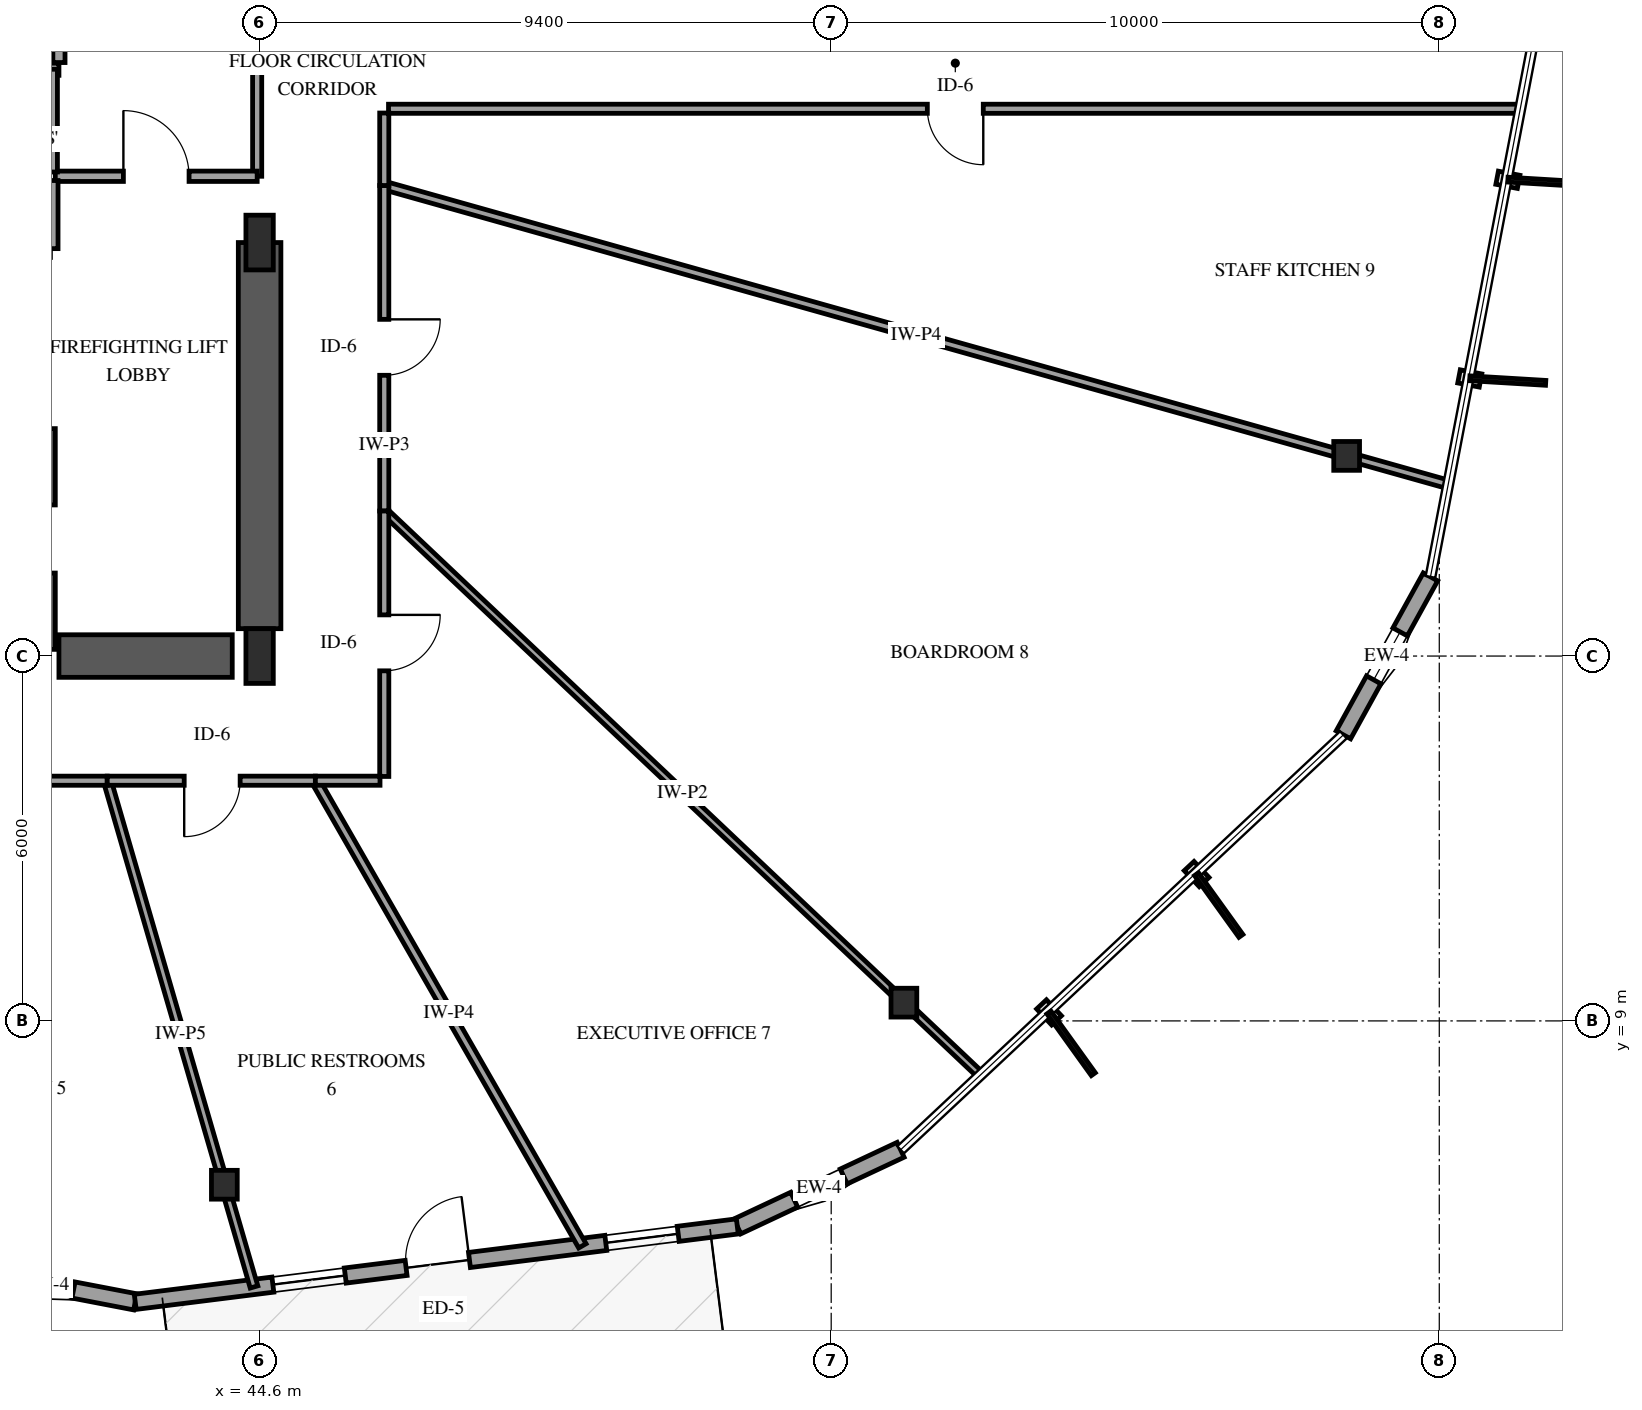
"""IFC4 building model, lengths in metres.
Left out: names, types, materials, properties, quantities, classifications, styles, units other than length and angle.
Written with IfcOpenShell. Run it as: python <this file> out.ifc"""

import sys

from ifc_helpers import new_model, si_unit, direction, frame, frame_2d, origin, origin_2d, place, context, subcontext, project, spatial, rectangle, i_section, extrude, element, fill, save


model = new_model("IFC4")
c1 = context("Model", 3, precision=1e-05, world=origin(), true_north=direction((0.0, 1.0)))
c2 = subcontext(c1, "Body", "Model", "MODEL_VIEW")
j1 = project(units=[si_unit("LENGTHUNIT", "METRE"), si_unit("PLANEANGLEUNIT", "RADIAN")], contexts=[c1])
p1 = place(None, origin())
s1 = spatial("IfcSite", under=j1, at=p1, CompositionType="ELEMENT")
p2 = place(p1, origin())
s2 = spatial("IfcBuilding", under=s1, at=p2, CompositionType="ELEMENT")
p3 = place(p2, frame((0.0, 0.0, 54.6)))
s3 = spatial("IfcBuildingStorey", under=s2, at=p3, CompositionType="ELEMENT", Elevation=54.6)
p4 = place(p3, frame((41.12, 15.11, 0.0), z_axis=(0.0, 0.0, 1.0), x_axis=(0.0, 1.0, 0.0)))
e1 = element("IfcWall", 1, at=p4, inside=s3, PredefinedType="SHEAR", context=c2, shape_type="SweptSolid", body=[
    extrude(rectangle(XDim=3.63, YDim=0.24, at=frame_2d((1.815, 0.0))), origin(), (0.0, 0.0, 1.0), 4.0),
])
p5 = place(p4, frame((1.255, 0.0, 0.0)))
e2 = element("IfcOpeningElement", 2, at=p5, cuts=e1, PredefinedType="OPENING", context=c2, shape_type="SweptSolid", body=[
    extrude(rectangle(XDim=1.12, YDim=2.15, at=frame_2d((0.56, 1.075))), frame((0.0, 0.13, 0.0), z_axis=(0.0, -1.0, 0.0), x_axis=(1.0, 0.0, 0.0)), (0.0, 0.0, 1.0), 0.26),
])
p6 = place(p3, frame((41.3, 15.0, 0.0), z_axis=(0.0, 0.0, 1.0), x_axis=(1.0, 0.0, 0.0)))
e3 = element("IfcWall", 3, at=p6, inside=s3, PredefinedType="SHEAR", context=c2, shape_type="SweptSolid", body=[
    extrude(rectangle(XDim=2.85, YDim=0.7, at=frame_2d((1.425, 0.0))), origin(), (0.0, 0.0, 1.0), 4.0),
])
p7 = place(p3, frame((44.6, 15.45, 0.0), z_axis=(0.0, 0.0, 1.0), x_axis=(0.0, 1.0, 0.0)))
e4 = element("IfcWall", 4, at=p7, inside=s3, PredefinedType="SHEAR", context=c2, shape_type="SweptSolid", body=[
    extrude(rectangle(XDim=6.35, YDim=0.7, at=frame_2d((3.175, 0.0))), origin(), (0.0, 0.0, 1.0), 4.0),
])
for number, where, z_axis, x_axis in (
    (5, (44.6, 15.0, 0.0), (0.0, 0.0, 1.0), (1.0, 0.0, 0.0)),
    (6, (44.6, 21.8, 0.0), (0.0, 0.0, 1.0), (1.0, 0.0, 0.0)),
):
    element("IfcColumn", number, at=place(p3, frame(where, z_axis=z_axis, x_axis=x_axis)), inside=s3, PredefinedType="PILASTER", context=c2, shape_type="SweptSolid", body=[
        extrude(rectangle(XDim=0.45, YDim=0.9, at=origin_2d()), origin(), (0.0, 0.0, 1.0), 4.0),
    ])
for number, where, z_axis, x_axis in (
    (7, (44.02, 6.306, 0.0), (0.0, 0.0, 1.0), (1.0, 0.0, 0.0)),
    (8, (55.196, 9.3, 0.0), (0.0, 0.0, 1.0), (1.0, 0.0, 0.0)),
    (9, (62.477, 18.292, 0.0), (0.0, 0.0, 1.0), (1.0, 0.0, 0.0)),
):
    element("IfcColumn", number, at=place(p3, frame(where, z_axis=z_axis, x_axis=x_axis)), inside=s3, PredefinedType="COLUMN", context=c2, shape_type="SweptSolid", body=[
        extrude(i_section(OverallWidth=0.424, OverallDepth=0.474, WebThickness=0.048, FlangeThickness=0.077, FilletRadius=0.038, at=origin_2d()), origin(), (0.0, 0.0, 1.0), 4.0),
    ])
p8 = place(p3, frame((39.641, 4.939, 0.0), z_axis=(0.0, 0.0, 1.0), x_axis=(0.982094979425, -0.188386441624, 0.0)))
e10 = element("IfcWall", 10, at=p8, inside=s3, PredefinedType="SOLIDWALL", context=c2, shape_type="SweptSolid", body=[
    extrude(rectangle(XDim=2.967, YDim=0.27, at=frame_2d((1.483, 0.0))), origin(), (0.0, 0.0, 1.0), 3.079),
])
p9 = place(p8, frame((1.033, 0.0, 0.75)))
e11 = element("IfcOpeningElement", 11, at=p9, cuts=e10, PredefinedType="OPENING", context=c2, shape_type="SweptSolid", body=[
    extrude(rectangle(XDim=0.9, YDim=1.5, at=frame_2d((0.45, 0.75))), frame((0.0, 0.145, 0.0), z_axis=(0.0, -1.0, 0.0), x_axis=(1.0, 0.0, 0.0)), (0.0, 0.0, 1.0), 0.29),
])
p10 = place(p3, frame((52.456, 5.62, 0.0), z_axis=(0.0, 0.0, 1.0), x_axis=(0.905276993573, 0.424821803711, 0.0)))
e12 = element("IfcWall", 12, at=p10, inside=s3, PredefinedType="SOLIDWALL", context=c2, shape_type="SweptSolid", body=[
    extrude(rectangle(XDim=2.967, YDim=0.27, at=frame_2d((1.483, 0.0))), origin(), (0.0, 0.0, 1.0), 3.079),
])
p11 = place(p10, frame((1.033, 0.0, 0.75)))
e13 = element("IfcOpeningElement", 13, at=p11, cuts=e12, PredefinedType="OPENING", context=c2, shape_type="SweptSolid", body=[
    extrude(rectangle(XDim=0.9, YDim=1.5, at=frame_2d((0.45, 0.75))), frame((0.0, 0.145, 0.0), z_axis=(0.0, -1.0, 0.0), x_axis=(1.0, 0.0, 0.0)), (0.0, 0.0, 1.0), 0.29),
])
p12 = place(p3, frame((42.554, 4.38, 0.0), z_axis=(0.0, 0.0, 1.0), x_axis=(0.992243587308, 0.124308742439, 0.0)))
e14 = element("IfcWall", 14, at=p12, inside=s3, PredefinedType="SOLIDWALL", context=c2, shape_type="SweptSolid", body=[
    extrude(rectangle(XDim=9.979, YDim=0.25, at=frame_2d((4.99, 0.0))), origin(), (0.0, 0.0, 1.0), 3.079),
])
p13 = place(p12, frame((4.49, 0.0, 0.0)))
e15 = element("IfcOpeningElement", 15, at=p13, cuts=e14, PredefinedType="OPENING", context=c2, shape_type="SweptSolid", body=[
    extrude(rectangle(XDim=1.05, YDim=2.15, at=frame_2d((0.525, 1.075))), frame((0.0, 0.135, 0.0), z_axis=(0.0, -1.0, 0.0), x_axis=(1.0, 0.0, 0.0)), (0.0, 0.0, 1.0), 0.27),
])
p14 = place(p12, frame((2.281, 0.0, 0.72)))
e16 = element("IfcOpeningElement", 16, at=p14, cuts=e14, PredefinedType="OPENING", context=c2, shape_type="SweptSolid", body=[
    extrude(rectangle(XDim=1.2, YDim=1.6, at=frame_2d((0.6, 0.8))), frame((0.0, 0.135, 0.0), z_axis=(0.0, -1.0, 0.0), x_axis=(1.0, 0.0, 0.0)), (0.0, 0.0, 1.0), 0.27),
])
p15 = place(p12, frame((7.799, 0.0, 0.72)))
e17 = element("IfcOpeningElement", 17, at=p15, cuts=e14, PredefinedType="OPENING", context=c2, shape_type="SweptSolid", body=[
    extrude(rectangle(XDim=1.2, YDim=1.6, at=frame_2d((0.6, 0.8))), frame((0.0, 0.135, 0.0), z_axis=(0.0, -1.0, 0.0), x_axis=(1.0, 0.0, 0.0)), (0.0, 0.0, 1.0), 0.27),
])
p16 = place(p3, frame((62.423, 13.704, 0.0), z_axis=(0.0, 0.0, 1.0), x_axis=(0.482670458227, 0.875802048841, 0.0)))
e18 = element("IfcWall", 18, at=p16, inside=s3, PredefinedType="SOLIDWALL", context=c2, shape_type="SweptSolid", body=[
    extrude(rectangle(XDim=2.967, YDim=0.27, at=frame_2d((1.483, 0.0))), origin(), (0.0, 0.0, 1.0), 3.079),
])
p17 = place(p16, frame((1.033, 0.0, 0.75)))
e19 = element("IfcOpeningElement", 19, at=p17, cuts=e18, PredefinedType="OPENING", context=c2, shape_type="SweptSolid", body=[
    extrude(rectangle(XDim=0.9, YDim=1.5, at=frame_2d((0.45, 0.75))), frame((0.0, 0.145, 0.0), z_axis=(0.0, -1.0, 0.0), x_axis=(1.0, 0.0, 0.0)), (0.0, 0.0, 1.0), 0.29),
])
p18 = place(p3, frame((39.3, 24.65, 0.0), z_axis=(0.0, 0.0, 1.0), x_axis=(1.0, 0.0, 0.0)))
e20 = element("IfcWall", 20, at=p18, inside=s3, PredefinedType="SOLIDWALL", context=c2, shape_type="SweptSolid", body=[
    extrude(rectangle(XDim=2.0, YDim=0.2, at=frame_2d((1.0, 0.0))), origin(), (0.0, 0.0, 1.0), 3.7),
])
p19 = place(p3, frame((41.3, 24.76, 0.0), z_axis=(0.0, 0.0, 1.0), x_axis=(0.0, 1.0, 0.0)))
e21 = element("IfcWall", 21, at=p19, inside=s3, PredefinedType="SOLIDWALL", context=c2, shape_type="SweptSolid", body=[
    extrude(rectangle(XDim=2.08, YDim=0.2, at=frame_2d((1.04, 0.0))), origin(), (0.0, 0.0, 1.0), 3.7),
])
p20 = place(p3, frame((65.332, 24.0, 0.0), z_axis=(0.0, 0.0, 1.0), x_axis=(-1.0, 0.0, 0.0)))
e22 = element("IfcWall", 22, at=p20, inside=s3, PredefinedType="PARTITIONING", context=c2, shape_type="SweptSolid", body=[
    extrude(rectangle(XDim=18.612, YDim=0.15, at=frame_2d((9.306, 0.0))), origin(), (0.0, 0.0, 1.0), 3.7),
])
p21 = place(p20, frame((8.831, 0.0, 0.0)))
e23 = element("IfcOpeningElement", 23, at=p21, cuts=e22, PredefinedType="OPENING", context=c2, shape_type="SweptSolid", body=[
    extrude(rectangle(XDim=0.92, YDim=2.12, at=frame_2d((0.46, 1.06))), frame((0.0, 0.085, 0.0), z_axis=(0.0, -1.0, 0.0), x_axis=(1.0, 0.0, 0.0)), (0.0, 0.0, 1.0), 0.17),
])
p22 = place(p3, frame((46.65, 22.738, 0.0), z_axis=(0.0, 0.0, 1.0), x_axis=(0.962723116404, -0.270488818886, 0.0)))
e24 = element("IfcWall", 24, at=p22, inside=s3, PredefinedType="PARTITIONING", context=c2, shape_type="SweptSolid", body=[
    extrude(rectangle(XDim=18.175, YDim=0.14, at=frame_2d((9.087, 0.0))), origin(), (0.0, 0.0, 1.0), 2.995),
])
p23 = place(p3, frame((46.65, 17.385, 0.0), z_axis=(0.0, 0.0, 1.0), x_axis=(0.726444008724, -0.687225655945, 0.0)))
e25 = element("IfcWall", 25, at=p23, inside=s3, PredefinedType="PARTITIONING", context=c2, shape_type="SweptSolid", body=[
    extrude(rectangle(XDim=13.496, YDim=0.12, at=frame_2d((6.748, 0.0))), origin(), (0.0, 0.0, 1.0), 2.995),
])
p24 = place(p3, frame((45.517, 12.95, 0.0), z_axis=(0.0, 0.0, 1.0), x_axis=(0.497852096221, -0.867261950214, 0.0)))
e26 = element("IfcWall", 26, at=p24, inside=s3, PredefinedType="PARTITIONING", context=c2, shape_type="SweptSolid", body=[
    extrude(rectangle(XDim=8.82, YDim=0.14, at=frame_2d((4.41, 0.0))), origin(), (0.0, 0.0, 1.0), 3.074),
])
p25 = place(p3, frame((42.094, 12.95, 0.0), z_axis=(0.0, 0.0, 1.0), x_axis=(0.278506003646, -0.960434488101, 0.0)))
e27 = element("IfcWall", 27, at=p25, inside=s3, PredefinedType="PARTITIONING", context=c2, shape_type="SweptSolid", body=[
    extrude(rectangle(XDim=8.668, YDim=0.13, at=frame_2d((4.334, 0.0))), origin(), (0.0, 0.0, 1.0), 2.995),
])
p26 = place(p3, frame((44.56, 29.8, 0.0), z_axis=(0.0, 0.0, 1.0), x_axis=(0.0, -1.0, 0.0)))
e28 = element("IfcWall", 28, at=p26, inside=s3, PredefinedType="PARTITIONING", context=c2, shape_type="SweptSolid", body=[
    extrude(rectangle(XDim=6.91, YDim=0.15, at=frame_2d((3.455, 0.0))), origin(), (0.0, 0.0, 1.0), 2.74),
])
p27 = place(p26, frame((2.915, 0.0, 0.0)))
e29 = element("IfcOpeningElement", 29, at=p27, cuts=e28, PredefinedType="OPENING", context=c2, shape_type="SweptSolid", body=[
    extrude(rectangle(XDim=1.08, YDim=2.15, at=frame_2d((0.54, 1.075))), frame((0.0, 0.085, 0.0), z_axis=(0.0, -1.0, 0.0), x_axis=(1.0, 0.0, 0.0)), (0.0, 0.0, 1.0), 0.17),
])
p28 = place(p3, frame((46.65, 22.738, 0.0), z_axis=(0.0, 0.0, 1.0), x_axis=(0.0, -1.0, 0.0)))
e30 = element("IfcWall", 30, at=p28, inside=s3, PredefinedType="PARTITIONING", context=c2, shape_type="SweptSolid", body=[
    extrude(rectangle(XDim=5.353, YDim=0.15, at=frame_2d((2.677, 0.0))), origin(), (0.0, 0.0, 1.0), 3.7),
])
p29 = place(p28, frame((2.201, 0.0, 0.0)))
e31 = element("IfcOpeningElement", 31, at=p29, cuts=e30, PredefinedType="OPENING", context=c2, shape_type="SweptSolid", body=[
    extrude(rectangle(XDim=0.92, YDim=2.12, at=frame_2d((0.46, 1.06))), frame((0.0, 0.085, 0.0), z_axis=(0.0, -1.0, 0.0), x_axis=(1.0, 0.0, 0.0)), (0.0, 0.0, 1.0), 0.17),
])
p30 = place(p3, frame((46.65, 17.385, 0.0), z_axis=(0.0, 0.0, 1.0), x_axis=(0.0, -1.0, 0.0)))
e32 = element("IfcWall", 32, at=p30, inside=s3, PredefinedType="PARTITIONING", context=c2, shape_type="SweptSolid", body=[
    extrude(rectangle(XDim=4.365, YDim=0.15, at=frame_2d((2.183, 0.0))), origin(), (0.0, 0.0, 1.0), 3.7),
])
p31 = place(p30, frame((1.708, 0.0, 0.0)))
e33 = element("IfcOpeningElement", 33, at=p31, cuts=e32, PredefinedType="OPENING", context=c2, shape_type="SweptSolid", body=[
    extrude(rectangle(XDim=0.92, YDim=2.12, at=frame_2d((0.46, 1.06))), frame((0.0, 0.085, 0.0), z_axis=(0.0, -1.0, 0.0), x_axis=(1.0, 0.0, 0.0)), (0.0, 0.0, 1.0), 0.17),
])
p32 = place(p3, frame((42.094, 12.95, 0.0), z_axis=(0.0, 0.0, 1.0), x_axis=(-1.0, 0.0, 0.0)))
e34 = element("IfcWall", 34, at=p32, inside=s3, PredefinedType="PARTITIONING", context=c2, shape_type="SweptSolid", body=[
    extrude(rectangle(XDim=4.313, YDim=0.15, at=frame_2d((2.156, 0.0))), origin(), (0.0, 0.0, 1.0), 3.7),
])
p33 = place(p32, frame((1.682, 0.0, 0.0)))
e35 = element("IfcOpeningElement", 35, at=p33, cuts=e34, PredefinedType="OPENING", context=c2, shape_type="SweptSolid", body=[
    extrude(rectangle(XDim=0.92, YDim=2.12, at=frame_2d((0.46, 1.06))), frame((0.0, 0.085, 0.0), z_axis=(0.0, -1.0, 0.0), x_axis=(1.0, 0.0, 0.0)), (0.0, 0.0, 1.0), 0.17),
])
p34 = place(p3, frame((45.517, 12.95, 0.0), z_axis=(0.0, 0.0, 1.0), x_axis=(-1.0, 0.0, 0.0)))
e36 = element("IfcWall", 36, at=p34, inside=s3, PredefinedType="PARTITIONING", context=c2, shape_type="SweptSolid", body=[
    extrude(rectangle(XDim=3.423, YDim=0.15, at=frame_2d((1.711, 0.0))), origin(), (0.0, 0.0, 1.0), 3.7),
])
p35 = place(p34, frame((1.237, 0.0, 0.0)))
e37 = element("IfcOpeningElement", 37, at=p35, cuts=e36, PredefinedType="OPENING", context=c2, shape_type="SweptSolid", body=[
    extrude(rectangle(XDim=0.92, YDim=2.12, at=frame_2d((0.46, 1.06))), frame((0.0, 0.085, 0.0), z_axis=(0.0, -1.0, 0.0), x_axis=(1.0, 0.0, 0.0)), (0.0, 0.0, 1.0), 0.17),
])
p36 = place(p3, frame((41.24, 22.89, 0.0), z_axis=(0.0, 0.0, 1.0), x_axis=(1.0, 0.0, 0.0)))
e38 = element("IfcWall", 38, at=p36, inside=s3, PredefinedType="PARTITIONING", context=c2, shape_type="SweptSolid", body=[
    extrude(rectangle(XDim=3.32, YDim=0.17, at=frame_2d((1.66, 0.0))), origin(), (0.0, 0.0, 1.0), 3.7),
])
p37 = place(p36, frame((1.12, 0.0, 0.0)))
e39 = element("IfcOpeningElement", 39, at=p37, cuts=e38, PredefinedType="OPENING", context=c2, shape_type="SweptSolid", body=[
    extrude(rectangle(XDim=1.08, YDim=2.15, at=frame_2d((0.54, 1.075))), frame((0.0, 0.095, 0.0), z_axis=(0.0, -1.0, 0.0), x_axis=(1.0, 0.0, 0.0)), (0.0, 0.0, 1.0), 0.19),
])
p38 = place(p3, frame((41.2, 22.96, 0.0), z_axis=(0.0, 0.0, 1.0), x_axis=(0.0, 1.0, 0.0)))
e40 = element("IfcWall", 40, at=p38, inside=s3, PredefinedType="PARTITIONING", context=c2, shape_type="SweptSolid", body=[
    extrude(rectangle(XDim=1.69, YDim=0.15, at=frame_2d((0.845, 0.0))), origin(), (0.0, 0.0, 1.0), 3.7),
])
p39 = place(p3, frame((46.65, 23.93, 0.0), z_axis=(0.0, 0.0, 1.0), x_axis=(0.0, -1.0, 0.0)))
e41 = element("IfcWall", 41, at=p39, inside=s3, PredefinedType="PARTITIONING", context=c2, shape_type="SweptSolid", body=[
    extrude(rectangle(XDim=1.192, YDim=0.15, at=frame_2d((0.596, 0.0))), origin(), (0.0, 0.0, 1.0), 3.7),
])
p40 = place(p3, frame((41.2, 21.7, 0.0), z_axis=(0.0, 0.0, 1.0), x_axis=(0.0, 1.0, 0.0)))
e42 = element("IfcWall", 42, at=p40, inside=s3, PredefinedType="PARTITIONING", context=c2, shape_type="SweptSolid", body=[
    extrude(rectangle(XDim=1.12, YDim=0.17, at=frame_2d((0.56, 0.0))), origin(), (0.0, 0.0, 1.0), 3.7),
])
p41 = place(p3, frame((46.58, 12.95, 0.0), z_axis=(0.0, 0.0, 1.0), x_axis=(-1.0, 0.0, 0.0)))
e43 = element("IfcWall", 43, at=p41, inside=s3, PredefinedType="PARTITIONING", context=c2, shape_type="SweptSolid", body=[
    extrude(rectangle(XDim=1.063, YDim=0.15, at=frame_2d((0.531, 0.0))), origin(), (0.0, 0.0, 1.0), 3.7),
])
p42 = place(p9, origin())
e44 = element("IfcWindow", 44, at=p42, inside=s3, PartitioningType="SINGLE_PANEL", PredefinedType="WINDOW", context=c2, shape_type="SweptSolid", body=[
    extrude(rectangle(XDim=0.9, YDim=1.5, at=frame_2d((0.45, 0.75))), frame((0.0, 0.03, 0.0), z_axis=(0.0, -1.0, 0.0), x_axis=(1.0, 0.0, 0.0)), (0.0, 0.0, 1.0), 0.06),
])
fill(e11, e44)
p43 = place(p11, origin())
e45 = element("IfcWindow", 45, at=p43, inside=s3, PartitioningType="SINGLE_PANEL", PredefinedType="WINDOW", context=c2, shape_type="SweptSolid", body=[
    extrude(rectangle(XDim=0.9, YDim=1.5, at=frame_2d((0.45, 0.75))), frame((0.0, 0.03, 0.0), z_axis=(0.0, -1.0, 0.0), x_axis=(1.0, 0.0, 0.0)), (0.0, 0.0, 1.0), 0.06),
])
fill(e13, e45)
p44 = place(p13, origin())
e46 = element("IfcDoor", 46, at=p44, inside=s3, OperationType="SINGLE_SWING_RIGHT", PredefinedType="DOOR", context=c2, shape_type="SweptSolid", body=[
    extrude(rectangle(XDim=1.05, YDim=2.15, at=frame_2d((0.525, 1.075))), frame((0.0, 0.025, 0.0), z_axis=(0.0, -1.0, 0.0), x_axis=(1.0, 0.0, 0.0)), (0.0, 0.0, 1.0), 0.05),
])
fill(e15, e46)
p45 = place(p14, origin())
e47 = element("IfcWindow", 47, at=p45, inside=s3, PartitioningType="SINGLE_PANEL", PredefinedType="WINDOW", context=c2, shape_type="SweptSolid", body=[
    extrude(rectangle(XDim=1.2, YDim=1.6, at=frame_2d((0.6, 0.8))), frame((0.0, 0.03, 0.0), z_axis=(0.0, -1.0, 0.0), x_axis=(1.0, 0.0, 0.0)), (0.0, 0.0, 1.0), 0.06),
])
fill(e16, e47)
p46 = place(p15, origin())
e48 = element("IfcWindow", 48, at=p46, inside=s3, PartitioningType="SINGLE_PANEL", PredefinedType="WINDOW", context=c2, shape_type="SweptSolid", body=[
    extrude(rectangle(XDim=1.2, YDim=1.6, at=frame_2d((0.6, 0.8))), frame((0.0, 0.03, 0.0), z_axis=(0.0, -1.0, 0.0), x_axis=(1.0, 0.0, 0.0)), (0.0, 0.0, 1.0), 0.06),
])
fill(e17, e48)
p47 = place(p17, origin())
e49 = element("IfcWindow", 49, at=p47, inside=s3, PartitioningType="SINGLE_PANEL", PredefinedType="WINDOW", context=c2, shape_type="SweptSolid", body=[
    extrude(rectangle(XDim=0.9, YDim=1.5, at=frame_2d((0.45, 0.75))), frame((0.0, 0.03, 0.0), z_axis=(0.0, -1.0, 0.0), x_axis=(1.0, 0.0, 0.0)), (0.0, 0.0, 1.0), 0.06),
])
fill(e19, e49)
p48 = place(p21, origin())
e50 = element("IfcDoor", 50, at=p48, inside=s3, OperationType="SINGLE_SWING_LEFT", PredefinedType="DOOR", context=c2, shape_type="SweptSolid", body=[
    extrude(rectangle(XDim=0.92, YDim=2.12, at=frame_2d((0.46, 1.06))), frame((0.0, 0.025, 0.0), z_axis=(0.0, -1.0, 0.0), x_axis=(1.0, 0.0, 0.0)), (0.0, 0.0, 1.0), 0.05),
])
fill(e23, e50)
p49 = place(p29, origin())
e51 = element("IfcDoor", 51, at=p49, inside=s3, OperationType="SINGLE_SWING_LEFT", PredefinedType="DOOR", context=c2, shape_type="SweptSolid", body=[
    extrude(rectangle(XDim=0.92, YDim=2.12, at=frame_2d((0.46, 1.06))), frame((0.0, 0.025, 0.0), z_axis=(0.0, -1.0, 0.0), x_axis=(1.0, 0.0, 0.0)), (0.0, 0.0, 1.0), 0.05),
])
fill(e31, e51)
p50 = place(p31, origin())
e52 = element("IfcDoor", 52, at=p50, inside=s3, OperationType="SINGLE_SWING_LEFT", PredefinedType="DOOR", context=c2, shape_type="SweptSolid", body=[
    extrude(rectangle(XDim=0.92, YDim=2.12, at=frame_2d((0.46, 1.06))), frame((0.0, 0.025, 0.0), z_axis=(0.0, -1.0, 0.0), x_axis=(1.0, 0.0, 0.0)), (0.0, 0.0, 1.0), 0.05),
])
fill(e33, e52)
p51 = place(p35, origin())
e53 = element("IfcDoor", 53, at=p51, inside=s3, OperationType="SINGLE_SWING_RIGHT", PredefinedType="DOOR", context=c2, shape_type="SweptSolid", body=[
    extrude(rectangle(XDim=0.92, YDim=2.12, at=frame_2d((0.46, 1.06))), frame((0.0, 0.025, 0.0), z_axis=(0.0, -1.0, 0.0), x_axis=(1.0, 0.0, 0.0)), (0.0, 0.0, 1.0), 0.05),
])
fill(e37, e53)
p52 = place(p37, origin())
e54 = element("IfcDoor", 54, at=p52, inside=s3, OperationType="SINGLE_SWING_LEFT", PredefinedType="DOOR", context=c2, shape_type="SweptSolid", body=[
    extrude(rectangle(XDim=1.08, YDim=2.15, at=frame_2d((0.54, 1.075))), frame((0.0, 0.025, 0.0), z_axis=(0.0, -1.0, 0.0), x_axis=(1.0, 0.0, 0.0)), (0.0, 0.0, 1.0), 0.05),
])
fill(e39, e54)
save(model, sys.argv[1])
